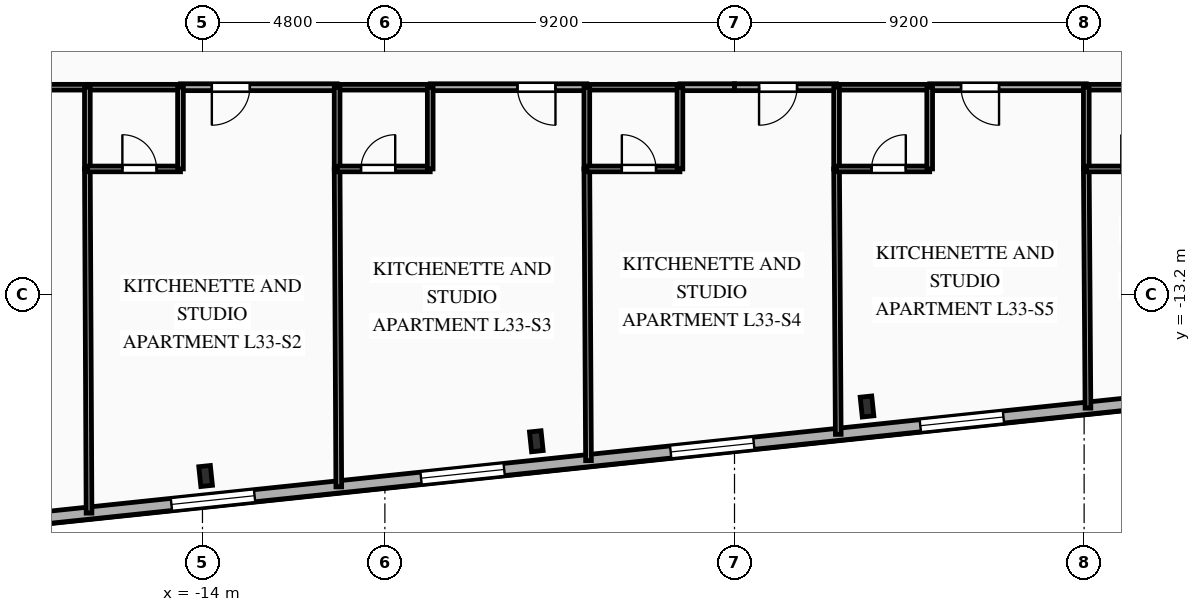
"""IFC4 building model, lengths in metres.
Left out: names, types, materials, properties, quantities, classifications, styles, units other than length and angle.
Written with IfcOpenShell. Run it as: python <this file> out.ifc"""

import sys

from ifc_helpers import new_model, si_unit, direction, frame, frame_2d, origin, origin_2d, place, context, subcontext, project, spatial, rectangle, i_section, extrude, element, fill, save


model = new_model("IFC4")
c1 = context("Model", 3, precision=1e-05, world=origin(), true_north=direction((0.0, 1.0)))
c2 = subcontext(c1, "Body", "Model", "MODEL_VIEW")
j1 = project(units=[si_unit("LENGTHUNIT", "METRE"), si_unit("PLANEANGLEUNIT", "RADIAN")], contexts=[c1])
p1 = place(None, origin())
s1 = spatial("IfcSite", under=j1, at=p1, CompositionType="ELEMENT")
p2 = place(p1, origin())
s2 = spatial("IfcBuilding", under=s1, at=p2, CompositionType="ELEMENT")
p3 = place(p2, frame((0.0, 0.0, 119.2)))
s3 = spatial("IfcBuildingStorey", under=s2, at=p3, CompositionType="ELEMENT", Elevation=119.2)
for number, where, z_axis, x_axis in (
    (1, (-13.917, -17.98, 0.0), (0.0, 0.0, 1.0), (0.995, 0.105, 0.0)),
    (2, (-5.215, -17.066, 0.0), (0.0, 0.0, 1.0), (0.995, 0.105, 0.0)),
    (3, (3.487, -16.151, 0.0), (0.0, 0.0, 1.0), (0.995, 0.105, 0.0)),
):
    element("IfcColumn", number, at=place(p3, frame(where, z_axis=z_axis, x_axis=x_axis)), inside=s3, PredefinedType="COLUMN", context=c2, shape_type="SweptSolid", body=[
        extrude(i_section(OverallWidth=0.306, OverallDepth=0.524, WebThickness=0.021, FlangeThickness=0.04, FilletRadius=0.027, at=origin_2d()), origin(), (0.0, 0.0, 1.0), 3.35),
    ])
p4 = place(p3, frame((30.307, -13.986, 0.0), z_axis=(0.0, 0.0, 1.0), x_axis=(-0.994521628355, -0.104531003701, 0.0)))
e4 = element("IfcWall", 4, at=p4, inside=s3, PredefinedType="SOLIDWALL", context=c2, shape_type="SweptSolid", body=[
    extrude(rectangle(XDim=53.8, YDim=0.32, at=frame_2d((26.9, 0.0))), origin(), (0.0, 0.0, 1.0), 3.045),
])
p5 = place(p4, frame((3.098, 0.0, 0.85)))
e5 = element("IfcOpeningElement", 5, at=p5, cuts=e4, PredefinedType="OPENING", context=c2, shape_type="SweptSolid", body=[
    extrude(rectangle(XDim=1.65, YDim=1.85, at=frame_2d((0.825, 0.925))), frame((0.0, 0.17, 0.0), z_axis=(0.0, -1.0, 0.0), x_axis=(1.0, 0.0, 0.0)), (0.0, 0.0, 1.0), 0.34),
])
p6 = place(p4, frame((10.143, 0.0, 0.85)))
e6 = element("IfcOpeningElement", 6, at=p6, cuts=e4, PredefinedType="OPENING", context=c2, shape_type="SweptSolid", body=[
    extrude(rectangle(XDim=1.65, YDim=1.85, at=frame_2d((0.825, 0.925))), frame((0.0, 0.17, 0.0), z_axis=(0.0, -1.0, 0.0), x_axis=(1.0, 0.0, 0.0)), (0.0, 0.0, 1.0), 0.34),
])
p7 = place(p4, frame((16.753, 0.0, 0.85)))
e7 = element("IfcOpeningElement", 7, at=p7, cuts=e4, PredefinedType="OPENING", context=c2, shape_type="SweptSolid", body=[
    extrude(rectangle(XDim=2.2, YDim=1.85, at=frame_2d((1.1, 0.925))), frame((0.0, 0.17, 0.0), z_axis=(0.0, -1.0, 0.0), x_axis=(1.0, 0.0, 0.0)), (0.0, 0.0, 1.0), 0.34),
])
p8 = place(p4, frame((23.358, 0.0, 0.85)))
e8 = element("IfcOpeningElement", 8, at=p8, cuts=e4, PredefinedType="OPENING", context=c2, shape_type="SweptSolid", body=[
    extrude(rectangle(XDim=2.2, YDim=1.85, at=frame_2d((1.1, 0.925))), frame((0.0, 0.17, 0.0), z_axis=(0.0, -1.0, 0.0), x_axis=(1.0, 0.0, 0.0)), (0.0, 0.0, 1.0), 0.34),
])
p9 = place(p4, frame((29.963, 0.0, 0.85)))
e9 = element("IfcOpeningElement", 9, at=p9, cuts=e4, PredefinedType="OPENING", context=c2, shape_type="SweptSolid", body=[
    extrude(rectangle(XDim=2.2, YDim=1.85, at=frame_2d((1.1, 0.925))), frame((0.0, 0.17, 0.0), z_axis=(0.0, -1.0, 0.0), x_axis=(1.0, 0.0, 0.0)), (0.0, 0.0, 1.0), 0.34),
])
p10 = place(p4, frame((36.568, 0.0, 0.85)))
e10 = element("IfcOpeningElement", 10, at=p10, cuts=e4, PredefinedType="OPENING", context=c2, shape_type="SweptSolid", body=[
    extrude(rectangle(XDim=2.2, YDim=1.85, at=frame_2d((1.1, 0.925))), frame((0.0, 0.17, 0.0), z_axis=(0.0, -1.0, 0.0), x_axis=(1.0, 0.0, 0.0)), (0.0, 0.0, 1.0), 0.34),
])
p11 = place(p4, frame((43.173, 0.0, 0.85)))
e11 = element("IfcOpeningElement", 11, at=p11, cuts=e4, PredefinedType="OPENING", context=c2, shape_type="SweptSolid", body=[
    extrude(rectangle(XDim=2.2, YDim=1.85, at=frame_2d((1.1, 0.925))), frame((0.0, 0.17, 0.0), z_axis=(0.0, -1.0, 0.0), x_axis=(1.0, 0.0, 0.0)), (0.0, 0.0, 1.0), 0.34),
])
p12 = place(p4, frame((49.653, 0.0, 0.85)))
e12 = element("IfcOpeningElement", 12, at=p12, cuts=e4, PredefinedType="OPENING", context=c2, shape_type="SweptSolid", body=[
    extrude(rectangle(XDim=1.65, YDim=1.85, at=frame_2d((0.825, 0.925))), frame((0.0, 0.17, 0.0), z_axis=(0.0, -1.0, 0.0), x_axis=(1.0, 0.0, 0.0)), (0.0, 0.0, 1.0), 0.34),
])
p13 = place(p3, frame((-17.029, -7.75, 0.0), z_axis=(0.0, 0.0, 1.0), x_axis=(-1.0, 0.0, 0.0)))
e13 = element("IfcWall", 13, at=p13, inside=s3, PredefinedType="PARTITIONING", context=c2, shape_type="SweptSolid", body=[
    extrude(rectangle(XDim=5.971, YDim=0.15, at=frame_2d((2.985, 0.0))), origin(), (0.0, 0.0, 1.0), 3.045),
])
p14 = place(p13, frame((3.871, 0.0, 0.0)))
e14 = element("IfcOpeningElement", 14, at=p14, cuts=e13, PredefinedType="OPENING", context=c2, shape_type="SweptSolid", body=[
    extrude(rectangle(XDim=1.05, YDim=2.15, at=frame_2d((0.525, 1.075))), frame((0.0, 0.085, 0.0), z_axis=(0.0, -1.0, 0.0), x_axis=(1.0, 0.0, 0.0)), (0.0, 0.0, 1.0), 0.17),
])
p15 = place(p3, frame((-10.457, -7.75, 0.0), z_axis=(0.0, 0.0, 1.0), x_axis=(-1.0, 0.0, 0.0)))
e15 = element("IfcWall", 15, at=p15, inside=s3, PredefinedType="PARTITIONING", context=c2, shape_type="SweptSolid", body=[
    extrude(rectangle(XDim=4.122, YDim=0.18, at=frame_2d((2.061, 0.0))), origin(), (0.0, 0.0, 1.0), 3.045),
])
p16 = place(p15, frame((2.297, 0.0, 0.0)))
e16 = element("IfcOpeningElement", 16, at=p16, cuts=e15, PredefinedType="OPENING", context=c2, shape_type="SweptSolid", body=[
    extrude(rectangle(XDim=1.0, YDim=2.15, at=frame_2d((0.5, 1.075))), frame((0.0, 0.1, 0.0), z_axis=(0.0, -1.0, 0.0), x_axis=(1.0, 0.0, 0.0)), (0.0, 0.0, 1.0), 0.2),
])
p17 = place(p3, frame((-14.579, -7.75, 0.0), z_axis=(0.0, 0.0, 1.0), x_axis=(-1.0, 0.0, 0.0)))
e17 = element("IfcWall", 17, at=p17, inside=s3, PredefinedType="PLUMBINGWALL", context=c2, shape_type="SweptSolid", body=[
    extrude(rectangle(XDim=2.45, YDim=0.15, at=frame_2d((1.225, 0.0))), origin(), (0.0, 0.0, 1.0), 3.045),
])
p18 = place(p3, frame((-3.886, -7.75, 0.0), z_axis=(0.0, 0.0, 1.0), x_axis=(-1.0, 0.0, 0.0)))
e18 = element("IfcWall", 18, at=p18, inside=s3, PredefinedType="PARTITIONING", context=c2, shape_type="SweptSolid", body=[
    extrude(rectangle(XDim=4.121, YDim=0.18, at=frame_2d((2.061, 0.0))), origin(), (0.0, 0.0, 1.0), 3.045),
])
p19 = place(p18, frame((0.825, 0.0, 0.0)))
e19 = element("IfcOpeningElement", 19, at=p19, cuts=e18, PredefinedType="OPENING", context=c2, shape_type="SweptSolid", body=[
    extrude(rectangle(XDim=1.0, YDim=2.15, at=frame_2d((0.5, 1.075))), frame((0.0, 0.1, 0.0), z_axis=(0.0, -1.0, 0.0), x_axis=(1.0, 0.0, 0.0)), (0.0, 0.0, 1.0), 0.2),
])
p20 = place(p3, frame((-8.007, -7.75, 0.0), z_axis=(0.0, 0.0, 1.0), x_axis=(-1.0, 0.0, 0.0)))
e20 = element("IfcWall", 20, at=p20, inside=s3, PredefinedType="PLUMBINGWALL", context=c2, shape_type="SweptSolid", body=[
    extrude(rectangle(XDim=2.45, YDim=0.15, at=frame_2d((1.225, 0.0))), origin(), (0.0, 0.0, 1.0), 3.045),
])
p21 = place(p3, frame((0.0, -7.75, 0.0), z_axis=(0.0, 0.0, 1.0), x_axis=(-1.0, 0.0, 0.0)))
e21 = element("IfcWall", 21, at=p21, inside=s3, PredefinedType="PARTITIONING", context=c2, shape_type="SweptSolid", body=[
    extrude(rectangle(XDim=1.436, YDim=0.18, at=frame_2d((0.718, 0.0))), origin(), (0.0, 0.0, 1.0), 3.045),
])
p22 = place(p3, frame((-1.436, -7.75, 0.0), z_axis=(0.0, 0.0, 1.0), x_axis=(-1.0, 0.0, 0.0)))
e22 = element("IfcWall", 22, at=p22, inside=s3, PredefinedType="PLUMBINGWALL", context=c2, shape_type="SweptSolid", body=[
    extrude(rectangle(XDim=2.45, YDim=0.15, at=frame_2d((1.225, 0.0))), origin(), (0.0, 0.0, 1.0), 3.045),
])
p23 = place(p3, frame((2.686, -7.75, 0.0), z_axis=(0.0, 0.0, 1.0), x_axis=(-1.0, 0.0, 0.0)))
e23 = element("IfcWall", 23, at=p23, inside=s3, PredefinedType="PARTITIONING", context=c2, shape_type="SweptSolid", body=[
    extrude(rectangle(XDim=2.686, YDim=0.18, at=frame_2d((1.343, 0.0))), origin(), (0.0, 0.0, 1.0), 3.045),
])
p24 = place(p23, frame((1.04, 0.0, 0.0)))
e24 = element("IfcOpeningElement", 24, at=p24, cuts=e23, PredefinedType="OPENING", context=c2, shape_type="SweptSolid", body=[
    extrude(rectangle(XDim=1.0, YDim=2.15, at=frame_2d((0.5, 1.075))), frame((0.0, 0.1, 0.0), z_axis=(0.0, -1.0, 0.0), x_axis=(1.0, 0.0, 0.0)), (0.0, 0.0, 1.0), 0.2),
])
p25 = place(p3, frame((9.257, -7.75, 0.0), z_axis=(0.0, 0.0, 1.0), x_axis=(-1.0, 0.0, 0.0)))
e25 = element("IfcWall", 25, at=p25, inside=s3, PredefinedType="PARTITIONING", context=c2, shape_type="SweptSolid", body=[
    extrude(rectangle(XDim=4.121, YDim=0.18, at=frame_2d((2.061, 0.0))), origin(), (0.0, 0.0, 1.0), 3.045),
])
p26 = place(p25, frame((2.296, 0.0, 0.0)))
e26 = element("IfcOpeningElement", 26, at=p26, cuts=e25, PredefinedType="OPENING", context=c2, shape_type="SweptSolid", body=[
    extrude(rectangle(XDim=1.0, YDim=2.15, at=frame_2d((0.5, 1.075))), frame((0.0, 0.1, 0.0), z_axis=(0.0, -1.0, 0.0), x_axis=(1.0, 0.0, 0.0)), (0.0, 0.0, 1.0), 0.2),
])
for number, where, z_axis, x_axis in (
    (27, (5.136, -7.75, 0.0), (0.0, 0.0, 1.0), (-1.0, 0.0, 0.0)),
    (28, (11.707, -7.75, 0.0), (0.0, 0.0, 1.0), (-1.0, 0.0, 0.0)),
):
    element("IfcWall", number, at=place(p3, frame(where, z_axis=z_axis, x_axis=x_axis)), inside=s3, PredefinedType="PLUMBINGWALL", context=c2, shape_type="SweptSolid", body=[
        extrude(rectangle(XDim=2.45, YDim=0.15, at=frame_2d((1.225, 0.0))), origin(), (0.0, 0.0, 1.0), 3.045),
    ])
p27 = place(p3, frame((-17.029, -9.9, 0.0), z_axis=(0.0, 0.0, 1.0), x_axis=(0.004852348859, -0.999988227286, 0.0)))
e29 = element("IfcWall", 29, at=p27, inside=s3, PredefinedType="PARTITIONING", context=c2, shape_type="SweptSolid", body=[
    extrude(rectangle(XDim=9.056, YDim=0.15, at=frame_2d((4.528, 0.0))), origin(), (0.0, 0.0, 1.0), 3.045),
])
p28 = place(p3, frame((-17.029, -7.75, 0.0), z_axis=(0.0, 0.0, 1.0), x_axis=(0.0, -1.0, 0.0)))
e30 = element("IfcWall", 30, at=p28, inside=s3, PredefinedType="PLUMBINGWALL", context=c2, shape_type="SweptSolid", body=[
    extrude(rectangle(XDim=2.15, YDim=0.15, at=frame_2d((1.075, 0.0))), origin(), (0.0, 0.0, 1.0), 3.045),
])
p29 = place(p3, frame((-17.029, -9.9, 0.0), z_axis=(0.0, 0.0, 1.0), x_axis=(1.0, 0.0, 0.0)))
e31 = element("IfcWall", 31, at=p29, inside=s3, PredefinedType="PLUMBINGWALL", context=c2, shape_type="SweptSolid", body=[
    extrude(rectangle(XDim=2.45, YDim=0.15, at=frame_2d((1.225, 0.0))), origin(), (0.0, 0.0, 1.0), 3.045),
])
p30 = place(p29, frame((0.921, 0.0, 0.0)))
e32 = element("IfcOpeningElement", 32, at=p30, cuts=e31, PredefinedType="OPENING", context=c2, shape_type="SweptSolid", body=[
    extrude(rectangle(XDim=0.9, YDim=2.1, at=frame_2d((0.45, 1.05))), frame((0.0, 0.085, 0.0), z_axis=(0.0, -1.0, 0.0), x_axis=(1.0, 0.0, 0.0)), (0.0, 0.0, 1.0), 0.17),
])
p31 = place(p3, frame((-14.579, -9.9, 0.0), z_axis=(0.0, 0.0, 1.0), x_axis=(0.0, 1.0, 0.0)))
e33 = element("IfcWall", 33, at=p31, inside=s3, PredefinedType="PLUMBINGWALL", context=c2, shape_type="SweptSolid", body=[
    extrude(rectangle(XDim=2.15, YDim=0.15, at=frame_2d((1.075, 0.0))), origin(), (0.0, 0.0, 1.0), 3.045),
])
p32 = place(p3, frame((-10.457, -9.9, 0.0), z_axis=(0.0, 0.0, 1.0), x_axis=(0.005252948012, -0.999986203173, 0.0)))
e34 = element("IfcWall", 34, at=p32, inside=s3, PredefinedType="PARTITIONING", context=c2, shape_type="SweptSolid", body=[
    extrude(rectangle(XDim=8.366, YDim=0.15, at=frame_2d((4.183, 0.0))), origin(), (0.0, 0.0, 1.0), 3.045),
])
p33 = place(p3, frame((-10.457, -7.75, 0.0), z_axis=(0.0, 0.0, 1.0), x_axis=(0.0, -1.0, 0.0)))
e35 = element("IfcWall", 35, at=p33, inside=s3, PredefinedType="PLUMBINGWALL", context=c2, shape_type="SweptSolid", body=[
    extrude(rectangle(XDim=2.15, YDim=0.15, at=frame_2d((1.075, 0.0))), origin(), (0.0, 0.0, 1.0), 3.045),
])
p34 = place(p3, frame((-10.457, -9.9, 0.0), z_axis=(0.0, 0.0, 1.0), x_axis=(1.0, 0.0, 0.0)))
e36 = element("IfcWall", 36, at=p34, inside=s3, PredefinedType="PLUMBINGWALL", context=c2, shape_type="SweptSolid", body=[
    extrude(rectangle(XDim=2.45, YDim=0.15, at=frame_2d((1.225, 0.0))), origin(), (0.0, 0.0, 1.0), 3.045),
])
p35 = place(p34, frame((0.629, 0.0, 0.0)))
e37 = element("IfcOpeningElement", 37, at=p35, cuts=e36, PredefinedType="OPENING", context=c2, shape_type="SweptSolid", body=[
    extrude(rectangle(XDim=0.9, YDim=2.1, at=frame_2d((0.45, 1.05))), frame((0.0, 0.085, 0.0), z_axis=(0.0, -1.0, 0.0), x_axis=(1.0, 0.0, 0.0)), (0.0, 0.0, 1.0), 0.17),
])
p36 = place(p3, frame((-8.007, -9.9, 0.0), z_axis=(0.0, 0.0, 1.0), x_axis=(0.0, 1.0, 0.0)))
e38 = element("IfcWall", 38, at=p36, inside=s3, PredefinedType="PLUMBINGWALL", context=c2, shape_type="SweptSolid", body=[
    extrude(rectangle(XDim=2.15, YDim=0.15, at=frame_2d((1.075, 0.0))), origin(), (0.0, 0.0, 1.0), 3.045),
])
p37 = place(p3, frame((-3.886, -9.9, 0.0), z_axis=(0.0, 0.0, 1.0), x_axis=(0.005725643334, -0.99998360837, 0.0)))
e39 = element("IfcWall", 39, at=p37, inside=s3, PredefinedType="PARTITIONING", context=c2, shape_type="SweptSolid", body=[
    extrude(rectangle(XDim=7.675, YDim=0.15, at=frame_2d((3.838, 0.0))), origin(), (0.0, 0.0, 1.0), 3.045),
])
p38 = place(p3, frame((-3.886, -7.75, 0.0), z_axis=(0.0, 0.0, 1.0), x_axis=(0.0, -1.0, 0.0)))
e40 = element("IfcWall", 40, at=p38, inside=s3, PredefinedType="PLUMBINGWALL", context=c2, shape_type="SweptSolid", body=[
    extrude(rectangle(XDim=2.15, YDim=0.15, at=frame_2d((1.075, 0.0))), origin(), (0.0, 0.0, 1.0), 3.045),
])
p39 = place(p3, frame((-3.886, -9.9, 0.0), z_axis=(0.0, 0.0, 1.0), x_axis=(1.0, 0.0, 0.0)))
e41 = element("IfcWall", 41, at=p39, inside=s3, PredefinedType="PLUMBINGWALL", context=c2, shape_type="SweptSolid", body=[
    extrude(rectangle(XDim=2.45, YDim=0.15, at=frame_2d((1.225, 0.0))), origin(), (0.0, 0.0, 1.0), 3.045),
])
p40 = place(p39, frame((0.921, 0.0, 0.0)))
e42 = element("IfcOpeningElement", 42, at=p40, cuts=e41, PredefinedType="OPENING", context=c2, shape_type="SweptSolid", body=[
    extrude(rectangle(XDim=0.9, YDim=2.1, at=frame_2d((0.45, 1.05))), frame((0.0, 0.085, 0.0), z_axis=(0.0, -1.0, 0.0), x_axis=(1.0, 0.0, 0.0)), (0.0, 0.0, 1.0), 0.17),
])
p41 = place(p3, frame((-1.436, -9.9, 0.0), z_axis=(0.0, 0.0, 1.0), x_axis=(0.0, 1.0, 0.0)))
e43 = element("IfcWall", 43, at=p41, inside=s3, PredefinedType="PLUMBINGWALL", context=c2, shape_type="SweptSolid", body=[
    extrude(rectangle(XDim=2.15, YDim=0.15, at=frame_2d((1.075, 0.0))), origin(), (0.0, 0.0, 1.0), 3.045),
])
p42 = place(p3, frame((2.686, -9.9, 0.0), z_axis=(0.0, 0.0, 1.0), x_axis=(0.006291821768, -0.999980206294, 0.0)))
e44 = element("IfcWall", 44, at=p42, inside=s3, PredefinedType="PARTITIONING", context=c2, shape_type="SweptSolid", body=[
    extrude(rectangle(XDim=6.985, YDim=0.15, at=frame_2d((3.492, 0.0))), origin(), (0.0, 0.0, 1.0), 3.045),
])
p43 = place(p3, frame((2.686, -7.75, 0.0), z_axis=(0.0, 0.0, 1.0), x_axis=(0.0, -1.0, 0.0)))
e45 = element("IfcWall", 45, at=p43, inside=s3, PredefinedType="PLUMBINGWALL", context=c2, shape_type="SweptSolid", body=[
    extrude(rectangle(XDim=2.15, YDim=0.15, at=frame_2d((1.075, 0.0))), origin(), (0.0, 0.0, 1.0), 3.045),
])
p44 = place(p3, frame((2.686, -9.9, 0.0), z_axis=(0.0, 0.0, 1.0), x_axis=(1.0, 0.0, 0.0)))
e46 = element("IfcWall", 46, at=p44, inside=s3, PredefinedType="PLUMBINGWALL", context=c2, shape_type="SweptSolid", body=[
    extrude(rectangle(XDim=2.45, YDim=0.15, at=frame_2d((1.225, 0.0))), origin(), (0.0, 0.0, 1.0), 3.045),
])
p45 = place(p44, frame((0.921, 0.0, 0.0)))
e47 = element("IfcOpeningElement", 47, at=p45, cuts=e46, PredefinedType="OPENING", context=c2, shape_type="SweptSolid", body=[
    extrude(rectangle(XDim=0.9, YDim=2.1, at=frame_2d((0.45, 1.05))), frame((0.0, 0.085, 0.0), z_axis=(0.0, -1.0, 0.0), x_axis=(1.0, 0.0, 0.0)), (0.0, 0.0, 1.0), 0.17),
])
p46 = place(p3, frame((5.136, -9.9, 0.0), z_axis=(0.0, 0.0, 1.0), x_axis=(0.0, 1.0, 0.0)))
e48 = element("IfcWall", 48, at=p46, inside=s3, PredefinedType="PLUMBINGWALL", context=c2, shape_type="SweptSolid", body=[
    extrude(rectangle(XDim=2.15, YDim=0.15, at=frame_2d((1.075, 0.0))), origin(), (0.0, 0.0, 1.0), 3.045),
])
p47 = place(p3, frame((9.257, -9.9, 0.0), z_axis=(0.0, 0.0, 1.0), x_axis=(0.006943468909, -0.999975893829, 0.0)))
e49 = element("IfcWall", 49, at=p47, inside=s3, PredefinedType="PARTITIONING", context=c2, shape_type="SweptSolid", body=[
    extrude(rectangle(XDim=6.294, YDim=0.15, at=frame_2d((3.147, 0.0))), origin(), (0.0, 0.0, 1.0), 3.045),
])
p48 = place(p3, frame((9.257, -7.75, 0.0), z_axis=(0.0, 0.0, 1.0), x_axis=(0.0, -1.0, 0.0)))
e50 = element("IfcWall", 50, at=p48, inside=s3, PredefinedType="PLUMBINGWALL", context=c2, shape_type="SweptSolid", body=[
    extrude(rectangle(XDim=2.15, YDim=0.15, at=frame_2d((1.075, 0.0))), origin(), (0.0, 0.0, 1.0), 3.045),
])
p49 = place(p3, frame((9.257, -9.9, 0.0), z_axis=(0.0, 0.0, 1.0), x_axis=(1.0, 0.0, 0.0)))
e51 = element("IfcWall", 51, at=p49, inside=s3, PredefinedType="PLUMBINGWALL", context=c2, shape_type="SweptSolid", body=[
    extrude(rectangle(XDim=2.45, YDim=0.15, at=frame_2d((1.225, 0.0))), origin(), (0.0, 0.0, 1.0), 3.045),
])
p50 = place(p49, frame((0.921, 0.0, 0.0)))
e52 = element("IfcOpeningElement", 52, at=p50, cuts=e51, PredefinedType="OPENING", context=c2, shape_type="SweptSolid", body=[
    extrude(rectangle(XDim=0.9, YDim=2.1, at=frame_2d((0.45, 1.05))), frame((0.0, 0.085, 0.0), z_axis=(0.0, -1.0, 0.0), x_axis=(1.0, 0.0, 0.0)), (0.0, 0.0, 1.0), 0.17),
])
p51 = place(p8, origin())
e53 = element("IfcWindow", 53, at=p51, inside=s3, PartitioningType="SINGLE_PANEL", PredefinedType="WINDOW", context=c2, shape_type="SweptSolid", body=[
    extrude(rectangle(XDim=2.2, YDim=1.85, at=frame_2d((1.1, 0.925))), frame((0.0, 0.03, 0.0), z_axis=(0.0, -1.0, 0.0), x_axis=(1.0, 0.0, 0.0)), (0.0, 0.0, 1.0), 0.06),
])
fill(e8, e53)
p52 = place(p9, origin())
e54 = element("IfcWindow", 54, at=p52, inside=s3, PartitioningType="SINGLE_PANEL", PredefinedType="WINDOW", context=c2, shape_type="SweptSolid", body=[
    extrude(rectangle(XDim=2.2, YDim=1.85, at=frame_2d((1.1, 0.925))), frame((0.0, 0.03, 0.0), z_axis=(0.0, -1.0, 0.0), x_axis=(1.0, 0.0, 0.0)), (0.0, 0.0, 1.0), 0.06),
])
fill(e9, e54)
p53 = place(p10, origin())
e55 = element("IfcWindow", 55, at=p53, inside=s3, PartitioningType="SINGLE_PANEL", PredefinedType="WINDOW", context=c2, shape_type="SweptSolid", body=[
    extrude(rectangle(XDim=2.2, YDim=1.85, at=frame_2d((1.1, 0.925))), frame((0.0, 0.03, 0.0), z_axis=(0.0, -1.0, 0.0), x_axis=(1.0, 0.0, 0.0)), (0.0, 0.0, 1.0), 0.06),
])
fill(e10, e55)
p54 = place(p11, origin())
e56 = element("IfcWindow", 56, at=p54, inside=s3, PartitioningType="SINGLE_PANEL", PredefinedType="WINDOW", context=c2, shape_type="SweptSolid", body=[
    extrude(rectangle(XDim=2.2, YDim=1.85, at=frame_2d((1.1, 0.925))), frame((0.0, 0.03, 0.0), z_axis=(0.0, -1.0, 0.0), x_axis=(1.0, 0.0, 0.0)), (0.0, 0.0, 1.0), 0.06),
])
fill(e11, e56)
p55 = place(p16, origin())
e57 = element("IfcDoor", 57, at=p55, inside=s3, OperationType="SINGLE_SWING_RIGHT", PredefinedType="DOOR", context=c2, shape_type="SweptSolid", body=[
    extrude(rectangle(XDim=1.0, YDim=2.15, at=frame_2d((0.5, 1.075))), frame((0.0, 0.025, 0.0), z_axis=(0.0, -1.0, 0.0), x_axis=(1.0, 0.0, 0.0)), (0.0, 0.0, 1.0), 0.05),
])
fill(e16, e57)
p56 = place(p19, origin())
e58 = element("IfcDoor", 58, at=p56, inside=s3, OperationType="SINGLE_SWING_LEFT", PredefinedType="DOOR", context=c2, shape_type="SweptSolid", body=[
    extrude(rectangle(XDim=1.0, YDim=2.15, at=frame_2d((0.5, 1.075))), frame((0.0, 0.025, 0.0), z_axis=(0.0, -1.0, 0.0), x_axis=(1.0, 0.0, 0.0)), (0.0, 0.0, 1.0), 0.05),
])
fill(e19, e58)
p57 = place(p24, origin())
e59 = element("IfcDoor", 59, at=p57, inside=s3, OperationType="SINGLE_SWING_RIGHT", PredefinedType="DOOR", context=c2, shape_type="SweptSolid", body=[
    extrude(rectangle(XDim=1.0, YDim=2.15, at=frame_2d((0.5, 1.075))), frame((0.0, 0.025, 0.0), z_axis=(0.0, -1.0, 0.0), x_axis=(1.0, 0.0, 0.0)), (0.0, 0.0, 1.0), 0.05),
])
fill(e24, e59)
p58 = place(p26, origin())
e60 = element("IfcDoor", 60, at=p58, inside=s3, OperationType="SINGLE_SWING_LEFT", PredefinedType="DOOR", context=c2, shape_type="SweptSolid", body=[
    extrude(rectangle(XDim=1.0, YDim=2.15, at=frame_2d((0.5, 1.075))), frame((0.0, 0.025, 0.0), z_axis=(0.0, -1.0, 0.0), x_axis=(1.0, 0.0, 0.0)), (0.0, 0.0, 1.0), 0.05),
])
fill(e26, e60)
p59 = place(p30, origin())
e61 = element("IfcDoor", 61, at=p59, inside=s3, OperationType="SINGLE_SWING_LEFT", PredefinedType="DOOR", context=c2, shape_type="SweptSolid", body=[
    extrude(rectangle(XDim=0.9, YDim=2.1, at=frame_2d((0.45, 1.05))), frame((0.0, 0.025, 0.0), z_axis=(0.0, -1.0, 0.0), x_axis=(1.0, 0.0, 0.0)), (0.0, 0.0, 1.0), 0.05),
])
fill(e32, e61)
p60 = place(p35, origin())
e62 = element("IfcDoor", 62, at=p60, inside=s3, OperationType="SINGLE_SWING_RIGHT", PredefinedType="DOOR", context=c2, shape_type="SweptSolid", body=[
    extrude(rectangle(XDim=0.9, YDim=2.1, at=frame_2d((0.45, 1.05))), frame((0.0, 0.025, 0.0), z_axis=(0.0, -1.0, 0.0), x_axis=(1.0, 0.0, 0.0)), (0.0, 0.0, 1.0), 0.05),
])
fill(e37, e62)
p61 = place(p40, origin())
e63 = element("IfcDoor", 63, at=p61, inside=s3, OperationType="SINGLE_SWING_LEFT", PredefinedType="DOOR", context=c2, shape_type="SweptSolid", body=[
    extrude(rectangle(XDim=0.9, YDim=2.1, at=frame_2d((0.45, 1.05))), frame((0.0, 0.025, 0.0), z_axis=(0.0, -1.0, 0.0), x_axis=(1.0, 0.0, 0.0)), (0.0, 0.0, 1.0), 0.05),
])
fill(e42, e63)
p62 = place(p45, origin())
e64 = element("IfcDoor", 64, at=p62, inside=s3, OperationType="SINGLE_SWING_RIGHT", PredefinedType="DOOR", context=c2, shape_type="SweptSolid", body=[
    extrude(rectangle(XDim=0.9, YDim=2.1, at=frame_2d((0.45, 1.05))), frame((0.0, 0.025, 0.0), z_axis=(0.0, -1.0, 0.0), x_axis=(1.0, 0.0, 0.0)), (0.0, 0.0, 1.0), 0.05),
])
fill(e47, e64)
p63 = place(p50, origin())
e65 = element("IfcDoor", 65, at=p63, inside=s3, OperationType="SINGLE_SWING_LEFT", PredefinedType="DOOR", context=c2, shape_type="SweptSolid", body=[
    extrude(rectangle(XDim=0.9, YDim=2.1, at=frame_2d((0.45, 1.05))), frame((0.0, 0.025, 0.0), z_axis=(0.0, -1.0, 0.0), x_axis=(1.0, 0.0, 0.0)), (0.0, 0.0, 1.0), 0.05),
])
fill(e52, e65)
save(model, sys.argv[1])
